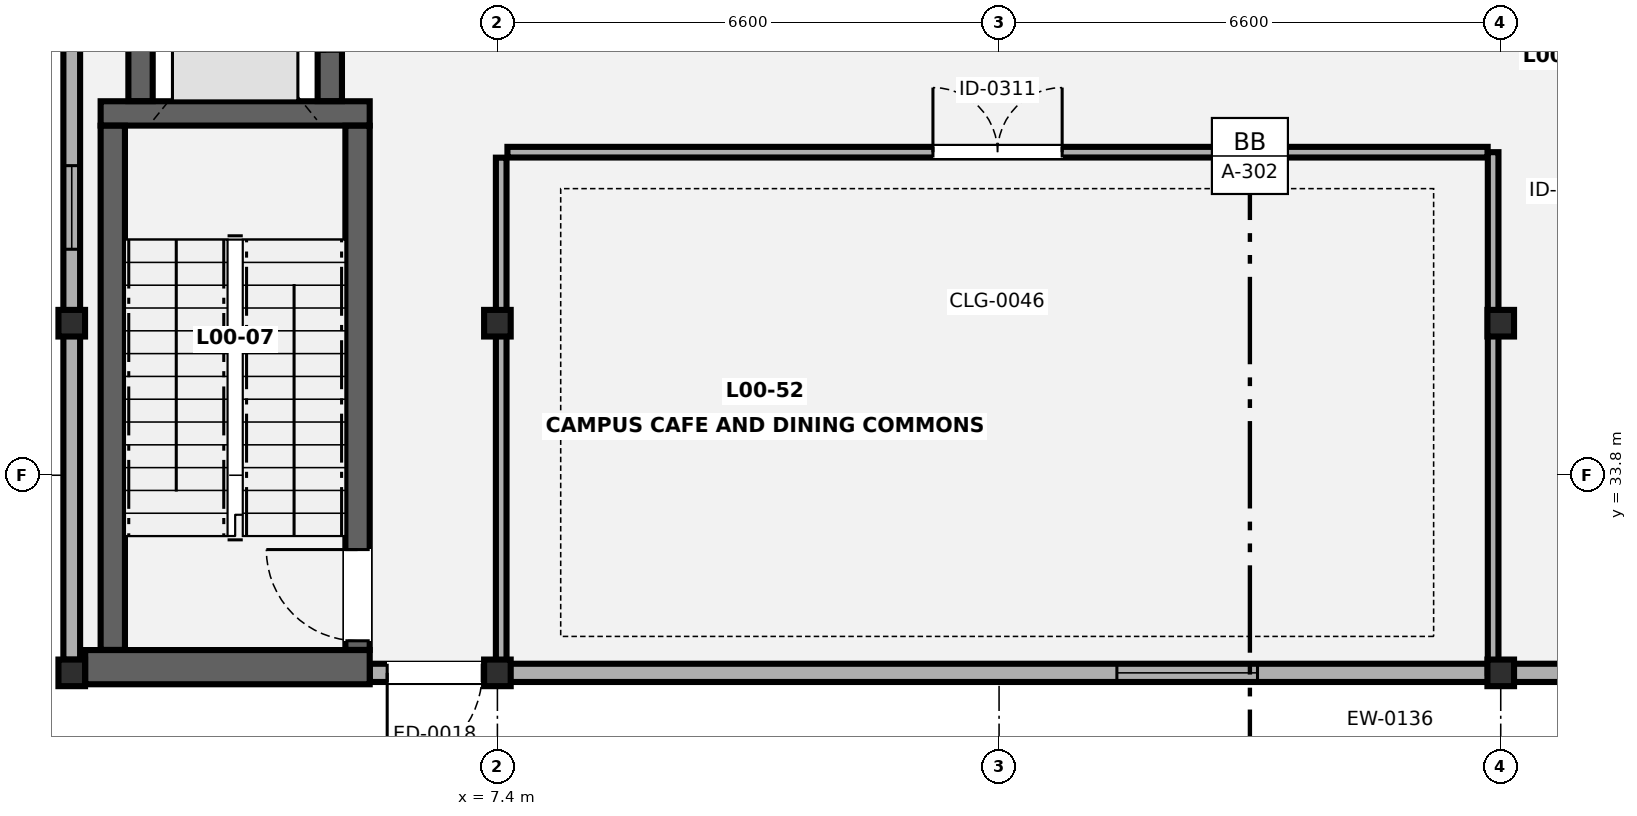
"""IFC4 building model, lengths in metres.
Left out: names, types, materials, properties, quantities, classifications, styles, units other than length and angle.
Written with IfcOpenShell. Run it as: python <this file> out.ifc"""

import sys

from ifc_helpers import new_model, si_unit, direction, frame, frame_2d, origin, origin_2d, place, context, subcontext, project, spatial, rectangle, i_section, extrude, element, fill, save


model = new_model("IFC4")
c1 = context("Model", 3, precision=1e-05, world=origin(), true_north=direction((0.0, 1.0)))
c2 = subcontext(c1, "Body", "Model", "MODEL_VIEW")
j1 = project(units=[si_unit("LENGTHUNIT", "METRE"), si_unit("PLANEANGLEUNIT", "RADIAN")], contexts=[c1])
p1 = place(None, origin())
s1 = spatial("IfcSite", under=j1, at=p1, CompositionType="ELEMENT")
p2 = place(p1, origin())
s2 = spatial("IfcBuilding", under=s1, at=p2, CompositionType="ELEMENT")
p3 = place(p2, origin())
s3 = spatial("IfcBuildingStorey", under=s2, at=p3, CompositionType="ELEMENT", Elevation=0.0)
for number, where, z_axis, x_axis in (
    (1, (1.8, 31.2, 0.0), (0.0, 0.0, 1.0), (1.0, 0.0, 0.0)),
    (2, (1.8, 35.8, 0.0), (0.0, 0.0, 1.0), (1.0, 0.0, 0.0)),
    (3, (7.4, 31.2, 0.0), (0.0, 0.0, 1.0), (1.0, 0.0, 0.0)),
    (4, (7.4, 35.8, 0.0), (0.0, 0.0, 1.0), (1.0, 0.0, 0.0)),
    (5, (20.6, 31.2, 0.0), (0.0, 0.0, 1.0), (1.0, 0.0, 0.0)),
    (6, (20.6, 35.8, 0.0), (0.0, 0.0, 1.0), (1.0, 0.0, 0.0)),
):
    element("IfcColumn", number, at=place(p3, frame(where, z_axis=z_axis, x_axis=x_axis)), inside=s3, PredefinedType="COLUMN", context=c2, shape_type="SweptSolid", body=[
        extrude(i_section(OverallWidth=0.35, OverallDepth=0.35, WebThickness=0.02, FlangeThickness=0.032, FilletRadius=0.016, at=origin_2d()), origin(), (0.0, 0.0, 1.0), 4.9),
    ])
p4 = place(p3, frame((1.8, 31.373, 0.0), z_axis=(0.0, 0.0, 1.0), x_axis=(0.0, 1.0, 0.0)))
e7 = element("IfcWall", 7, at=p4, inside=s3, PredefinedType="SOLIDWALL", context=c2, shape_type="SweptSolid", body=[
    extrude(rectangle(XDim=8.854, YDim=0.22, at=frame_2d((4.427, 0.0))), origin(), (0.0, 0.0, 1.0), 4.145),
])
p5 = place(p4, frame((5.4, 0.0, 0.85)))
e8 = element("IfcOpeningElement", 8, at=p5, cuts=e7, PredefinedType="OPENING", context=c2, shape_type="SweptSolid", body=[
    extrude(rectangle(XDim=1.1, YDim=1.4, at=frame_2d((0.55, 0.7))), frame((0.0, 0.12, 0.0), z_axis=(0.0, -1.0, 0.0), x_axis=(1.0, 0.0, 0.0)), (0.0, 0.0, 1.0), 0.24),
])
p6 = place(p3, frame((27.027, 31.2, 0.0), z_axis=(0.0, 0.0, 1.0), x_axis=(-1.0, 0.0, 0.0)))
e9 = element("IfcWall", 9, at=p6, inside=s3, PredefinedType="SOLIDWALL", context=c2, shape_type="SweptSolid", body=[
    extrude(rectangle(XDim=21.305, YDim=0.24, at=frame_2d((10.653, 0.0))), origin(), (0.0, 0.0, 1.0), 4.205),
])
p7 = place(p6, frame((19.827, 0.0, 0.0)))
e10 = element("IfcOpeningElement", 10, at=p7, cuts=e9, PredefinedType="OPENING", context=c2, shape_type="SweptSolid", body=[
    extrude(rectangle(XDim=1.25, YDim=2.15, at=frame_2d((0.625, 1.075))), frame((0.0, 0.13, 0.0), z_axis=(0.0, -1.0, 0.0), x_axis=(1.0, 0.0, 0.0)), (0.0, 0.0, 1.0), 0.26),
])
p8 = place(p6, frame((9.627, 0.0, 0.85)))
e11 = element("IfcOpeningElement", 11, at=p8, cuts=e9, PredefinedType="OPENING", context=c2, shape_type="SweptSolid", body=[
    extrude(rectangle(XDim=1.85, YDim=1.4, at=frame_2d((0.925, 0.7))), frame((0.0, 0.13, 0.0), z_axis=(0.0, -1.0, 0.0), x_axis=(1.0, 0.0, 0.0)), (0.0, 0.0, 1.0), 0.26),
])
p9 = place(p3, frame((1.977, 31.275, 0.0), z_axis=(0.0, 0.0, 1.0), x_axis=(1.0, 0.0, 0.0)))
e12 = element("IfcWall", 12, at=p9, inside=s3, PredefinedType="SHEAR", context=c2, shape_type="SweptSolid", body=[
    extrude(rectangle(XDim=3.743, YDim=0.45, at=frame_2d((1.872, 0.0))), origin(), (0.0, 0.0, 1.0), 4.7),
])
p10 = place(p3, frame((2.18, 38.56, 0.0), z_axis=(0.0, 0.0, 1.0), x_axis=(1.0, 0.0, 0.0)))
e13 = element("IfcWall", 13, at=p10, inside=s3, PredefinedType="SHEAR", context=c2, shape_type="SweptSolid", body=[
    extrude(rectangle(XDim=3.54, YDim=0.32, at=frame_2d((1.77, 0.0))), origin(), (0.0, 0.0, 1.0), 4.7),
])
p11 = place(p3, frame((2.34, 31.502, 0.0), z_axis=(0.0, 0.0, 1.0), x_axis=(0.0, 1.0, 0.0)))
e14 = element("IfcWall", 14, at=p11, inside=s3, PredefinedType="SHEAR", context=c2, shape_type="SweptSolid", body=[
    extrude(rectangle(XDim=6.896, YDim=0.32, at=frame_2d((3.448, 0.0))), origin(), (0.0, 0.0, 1.0), 4.7),
])
p12 = place(p3, frame((5.56, 31.502, 0.0), z_axis=(0.0, 0.0, 1.0), x_axis=(0.0, 1.0, 0.0)))
e15 = element("IfcWall", 15, at=p12, inside=s3, PredefinedType="SHEAR", context=c2, shape_type="SweptSolid", body=[
    extrude(rectangle(XDim=6.896, YDim=0.32, at=frame_2d((3.448, 0.0))), origin(), (0.0, 0.0, 1.0), 4.7),
])
p13 = place(p12, frame((0.12, 0.0, 0.0)))
e16 = element("IfcOpeningElement", 16, at=p13, cuts=e15, PredefinedType="OPENING", context=c2, shape_type="SweptSolid", body=[
    extrude(rectangle(XDim=1.2, YDim=2.15, at=frame_2d((0.6, 1.075))), frame((0.0, 0.17, 0.0), z_axis=(0.0, -1.0, 0.0), x_axis=(1.0, 0.0, 0.0)), (0.0, 0.0, 1.0), 0.34),
])
p14 = place(p3, frame((2.705, 38.722, 0.0), z_axis=(0.0, 0.0, 1.0), x_axis=(0.0, 1.0, 0.0)))
e17 = element("IfcWall", 17, at=p14, inside=s3, PredefinedType="SHEAR", context=c2, shape_type="SweptSolid", body=[
    extrude(rectangle(XDim=2.411, YDim=0.32, at=frame_2d((1.206, 0.0))), origin(), (0.0, 0.0, 1.0), 4.7),
])
p15 = place(p3, frame((5.195, 38.722, 0.0), z_axis=(0.0, 0.0, 1.0), x_axis=(0.0, 1.0, 0.0)))
e18 = element("IfcWall", 18, at=p15, inside=s3, PredefinedType="SHEAR", context=c2, shape_type="SweptSolid", body=[
    extrude(rectangle(XDim=2.411, YDim=0.32, at=frame_2d((1.206, 0.0))), origin(), (0.0, 0.0, 1.0), 4.7),
])
p16 = place(p15, frame((0.656, 0.0, 0.0)))
e19 = element("IfcOpeningElement", 19, at=p16, cuts=e18, PredefinedType="OPENING", context=c2, shape_type="SweptSolid", body=[
    extrude(rectangle(XDim=1.1, YDim=2.15, at=frame_2d((0.55, 1.075))), frame((0.0, 0.17, 0.0), z_axis=(0.0, -1.0, 0.0), x_axis=(1.0, 0.0, 0.0)), (0.0, 0.0, 1.0), 0.34),
])
p17 = place(p3, frame((7.532, 38.05, 0.0), z_axis=(0.0, 0.0, 1.0), x_axis=(1.0, 0.0, 0.0)))
e20 = element("IfcWall", 20, at=p17, inside=s3, PredefinedType="PARTITIONING", context=c2, shape_type="SweptSolid", body=[
    extrude(rectangle(XDim=12.896, YDim=0.14, at=frame_2d((6.448, 0.0))), origin(), (0.0, 0.0, 1.0), 4.298),
])
p18 = place(p17, frame((5.598, 0.0, 0.0)))
e21 = element("IfcOpeningElement", 21, at=p18, cuts=e20, PredefinedType="OPENING", context=c2, shape_type="SweptSolid", body=[
    extrude(rectangle(XDim=1.7, YDim=2.2, at=frame_2d((0.85, 1.1))), frame((0.0, 0.08, 0.0), z_axis=(0.0, -1.0, 0.0), x_axis=(1.0, 0.0, 0.0)), (0.0, 0.0, 1.0), 0.16),
])
p19 = place(p3, frame((7.45, 31.2, 0.0), z_axis=(0.0, 0.0, 1.0), x_axis=(0.0, 1.0, 0.0)))
e22 = element("IfcWall", 22, at=p19, inside=s3, PredefinedType="PARTITIONING", context=c2, shape_type="SweptSolid", body=[
    extrude(rectangle(XDim=6.778, YDim=0.14, at=frame_2d((3.389, 0.0))), origin(), (0.0, 0.0, 1.0), 4.145),
])
p20 = place(p3, frame((20.5, 31.2, 0.0), z_axis=(0.0, 0.0, 1.0), x_axis=(0.0, 1.0, 0.0)))
e23 = element("IfcWall", 23, at=p20, inside=s3, PredefinedType="PARTITIONING", context=c2, shape_type="SweptSolid", body=[
    extrude(rectangle(XDim=6.85, YDim=0.14, at=frame_2d((3.425, 0.0))), origin(), (0.0, 0.0, 1.0), 4.145),
])
p21 = place(p5, origin())
e24 = element("IfcWindow", 24, at=p21, inside=s3, PartitioningType="SINGLE_PANEL", PredefinedType="WINDOW", context=c2, shape_type="SweptSolid", body=[
    extrude(rectangle(XDim=1.1, YDim=1.4, at=frame_2d((0.55, 0.7))), frame((0.0, 0.03, 0.0), z_axis=(0.0, -1.0, 0.0), x_axis=(1.0, 0.0, 0.0)), (0.0, 0.0, 1.0), 0.06),
])
fill(e8, e24)
p22 = place(p7, origin())
e25 = element("IfcDoor", 25, at=p22, inside=s3, OperationType="SINGLE_SWING_RIGHT", PredefinedType="DOOR", context=c2, shape_type="SweptSolid", body=[
    extrude(rectangle(XDim=1.25, YDim=2.15, at=frame_2d((0.625, 1.075))), frame((0.0, 0.025, 0.0), z_axis=(0.0, -1.0, 0.0), x_axis=(1.0, 0.0, 0.0)), (0.0, 0.0, 1.0), 0.05),
])
fill(e10, e25)
p23 = place(p8, origin())
e26 = element("IfcWindow", 26, at=p23, inside=s3, PartitioningType="SINGLE_PANEL", PredefinedType="WINDOW", context=c2, shape_type="SweptSolid", body=[
    extrude(rectangle(XDim=1.85, YDim=1.4, at=frame_2d((0.925, 0.7))), frame((0.0, 0.03, 0.0), z_axis=(0.0, -1.0, 0.0), x_axis=(1.0, 0.0, 0.0)), (0.0, 0.0, 1.0), 0.06),
])
fill(e11, e26)
p24 = place(p13, origin())
e27 = element("IfcDoor", 27, at=p24, inside=s3, OperationType="SINGLE_SWING_RIGHT", PredefinedType="DOOR", context=c2, shape_type="SweptSolid", body=[
    extrude(rectangle(XDim=1.2, YDim=2.15, at=frame_2d((0.6, 1.075))), frame((0.0, 0.025, 0.0), z_axis=(0.0, -1.0, 0.0), x_axis=(1.0, 0.0, 0.0)), (0.0, 0.0, 1.0), 0.05),
])
fill(e16, e27)
p25 = place(p18, origin())
e28 = element("IfcDoor", 28, at=p25, inside=s3, OperationType="DOUBLE_DOOR_SINGLE_SWING", PredefinedType="DOOR", context=c2, shape_type="SweptSolid", body=[
    extrude(rectangle(XDim=1.7, YDim=2.2, at=frame_2d((0.85, 1.1))), frame((0.0, 0.025, 0.0), z_axis=(0.0, -1.0, 0.0), x_axis=(1.0, 0.0, 0.0)), (0.0, 0.0, 1.0), 0.05),
])
fill(e21, e28)
save(model, sys.argv[1])
